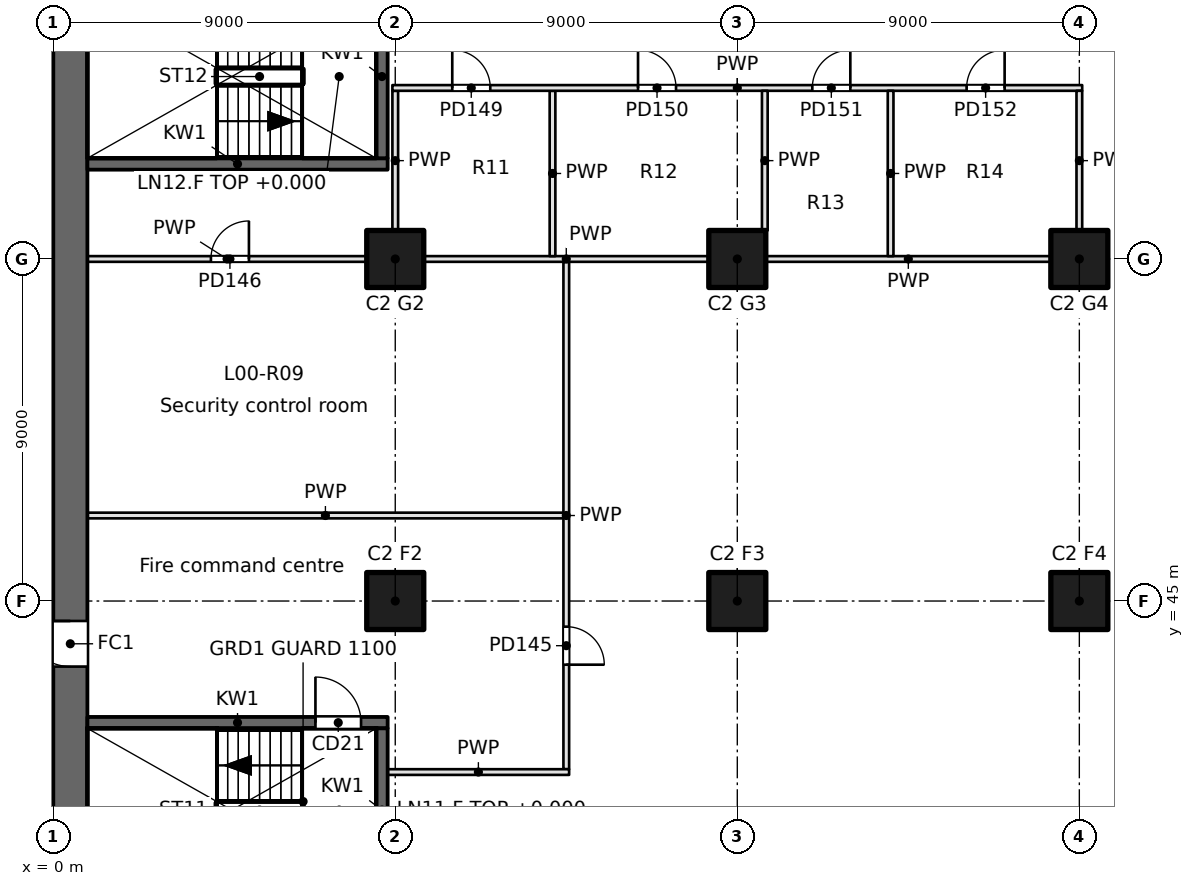
"""IFC4 building model, lengths in metres.
Left out: names, types, materials, properties, quantities, classifications, styles, units other than length and angle.
Written with IfcOpenShell. Run it as: python <this file> out.ifc"""

import sys

from ifc_helpers import new_model, si_unit, direction, frame, frame_2d, origin, origin_2d, place, context, subcontext, project, spatial, rectangle, extrude, element, fill, save


model = new_model("IFC4")
c1 = context("Model", 3, precision=1e-05, world=origin(), true_north=direction((0.0, 1.0)))
c2 = subcontext(c1, "Body", "Model", "MODEL_VIEW")
j1 = project(units=[si_unit("LENGTHUNIT", "METRE"), si_unit("PLANEANGLEUNIT", "RADIAN")], contexts=[c1])
p1 = place(None, origin())
s1 = spatial("IfcSite", under=j1, at=p1, CompositionType="ELEMENT")
p2 = place(p1, origin())
s2 = spatial("IfcBuilding", under=s1, at=p2, CompositionType="ELEMENT")
p3 = place(p2, origin())
s3 = spatial("IfcBuildingStorey", under=s2, at=p3, CompositionType="ELEMENT", Elevation=0.0)
for number, where, z_axis, x_axis in (
    (1, (9.0, 45.0, 0.0), (0.0, 0.0, 1.0), (1.0, 0.0, 0.0)),
    (2, (9.0, 54.0, 0.0), (0.0, 0.0, 1.0), (1.0, 0.0, 0.0)),
    (3, (18.0, 45.0, 0.0), (0.0, 0.0, 1.0), (1.0, 0.0, 0.0)),
    (4, (18.0, 54.0, 0.0), (0.0, 0.0, 1.0), (1.0, 0.0, 0.0)),
    (5, (27.0, 45.0, 0.0), (0.0, 0.0, 1.0), (1.0, 0.0, 0.0)),
    (6, (27.0, 54.0, 0.0), (0.0, 0.0, 1.0), (1.0, 0.0, 0.0)),
):
    element("IfcColumn", number, at=place(p3, frame(where, z_axis=z_axis, x_axis=x_axis)), inside=s3, PredefinedType="COLUMN", context=c2, shape_type="SweptSolid", body=[
        extrude(rectangle(XDim=1.5, YDim=1.5, at=origin_2d()), origin(), (0.0, 0.0, 1.0), 6.0),
    ])
p4 = place(p3, frame((0.45, 94.5, 0.0), z_axis=(0.0, 0.0, 1.0), x_axis=(0.0, -1.0, 0.0)))
e7 = element("IfcWall", 7, at=p4, inside=s3, PredefinedType="SHEAR", context=c2, shape_type="SweptSolid", body=[
    extrude(rectangle(XDim=66.085, YDim=0.9, at=frame_2d((33.042, 0.0))), origin(), (0.0, 0.0, 1.0), 6.0),
])
p5 = place(p4, frame((50.025, 0.0, 0.0)))
e8 = element("IfcOpeningElement", 8, at=p5, cuts=e7, PredefinedType="OPENING", context=c2, shape_type="SweptSolid", body=[
    extrude(rectangle(XDim=1.2, YDim=2.1, at=frame_2d((0.6, 1.05))), frame((0.0, 0.45, 0.0), z_axis=(0.0, -1.0, 0.0), x_axis=(1.0, 0.0, 0.0)), (0.0, 0.0, 1.0), 0.9),
])
p6 = place(p3, frame((0.9, 41.8, -0.4), z_axis=(0.0, 0.0, 1.0), x_axis=(1.0, 0.0, 0.0)))
e9 = element("IfcWall", 9, at=p6, inside=s3, PredefinedType="SOLIDWALL", context=c2, shape_type="SweptSolid", body=[
    extrude(rectangle(XDim=7.9, YDim=0.3, at=frame_2d((3.95, 0.0))), origin(), (0.0, 0.0, 1.0), 6.05),
])
p7 = place(p6, frame((6.0, 0.0, 0.4)))
e10 = element("IfcOpeningElement", 10, at=p7, cuts=e9, PredefinedType="OPENING", context=c2, shape_type="SweptSolid", body=[
    extrude(rectangle(XDim=1.2, YDim=2.1, at=frame_2d((0.6, 1.05))), frame((0.0, 0.15, 0.0), z_axis=(0.0, -1.0, 0.0), x_axis=(1.0, 0.0, 0.0)), (0.0, 0.0, 1.0), 0.3),
])
p8 = place(p3, frame((0.9, 56.5, -0.4), z_axis=(0.0, 0.0, 1.0), x_axis=(1.0, 0.0, 0.0)))
e11 = element("IfcWall", 11, at=p8, inside=s3, PredefinedType="SOLIDWALL", context=c2, shape_type="SweptSolid", body=[
    extrude(rectangle(XDim=7.9, YDim=0.3, at=frame_2d((3.95, 0.0))), origin(), (0.0, 0.0, 1.0), 6.05),
])
p9 = place(p3, frame((8.65, 37.35, -0.4), z_axis=(0.0, 0.0, 1.0), x_axis=(0.0, 1.0, 0.0)))
e12 = element("IfcWall", 12, at=p9, inside=s3, PredefinedType="SOLIDWALL", context=c2, shape_type="SweptSolid", body=[
    extrude(rectangle(XDim=4.3, YDim=0.3, at=frame_2d((2.15, 0.0))), origin(), (0.0, 0.0, 1.0), 6.05),
])
p10 = place(p3, frame((8.65, 56.65, -0.4), z_axis=(0.0, 0.0, 1.0), x_axis=(0.0, 1.0, 0.0)))
e13 = element("IfcWall", 13, at=p10, inside=s3, PredefinedType="SOLIDWALL", context=c2, shape_type="SweptSolid", body=[
    extrude(rectangle(XDim=4.3, YDim=0.3, at=frame_2d((2.15, 0.0))), origin(), (0.0, 0.0, 1.0), 6.05),
])
p11 = place(p3, frame((0.9, 47.25, 0.0), z_axis=(0.0, 0.0, 1.0), x_axis=(1.0, 0.0, 0.0)))
e14 = element("IfcWall", 14, at=p11, inside=s3, PredefinedType="PARTITIONING", context=c2, shape_type="SweptSolid", body=[
    extrude(rectangle(XDim=12.525, YDim=0.15, at=frame_2d((6.263, 0.0))), origin(), (0.0, 0.0, 1.0), 5.65),
])
p12 = place(p3, frame((13.5, 53.925, 0.0), z_axis=(0.0, 0.0, 1.0), x_axis=(0.0, -1.0, 0.0)))
e15 = element("IfcWall", 15, at=p12, inside=s3, PredefinedType="PARTITIONING", context=c2, shape_type="SweptSolid", body=[
    extrude(rectangle(XDim=13.35, YDim=0.15, at=frame_2d((6.675, 0.0))), origin(), (0.0, 0.0, 1.0), 5.65),
])
p13 = place(p12, frame((9.6, 0.0, 0.0)))
e16 = element("IfcOpeningElement", 16, at=p13, cuts=e15, PredefinedType="OPENING", context=c2, shape_type="SweptSolid", body=[
    extrude(rectangle(XDim=1.0, YDim=2.1, at=frame_2d((0.5, 1.05))), frame((0.0, 0.075, 0.0), z_axis=(0.0, -1.0, 0.0), x_axis=(1.0, 0.0, 0.0)), (0.0, 0.0, 1.0), 0.15),
])
p14 = place(p3, frame((13.575, 40.5, 0.0), z_axis=(0.0, 0.0, 1.0), x_axis=(-1.0, 0.0, 0.0)))
e17 = element("IfcWall", 17, at=p14, inside=s3, PredefinedType="PARTITIONING", context=c2, shape_type="SweptSolid", body=[
    extrude(rectangle(XDim=4.775, YDim=0.15, at=frame_2d((2.387, 0.0))), origin(), (0.0, 0.0, 1.0), 5.65),
])
p15 = place(p3, frame((0.9, 54.0, 0.0), z_axis=(0.0, 0.0, 1.0), x_axis=(1.0, 0.0, 0.0)))
e18 = element("IfcWall", 18, at=p15, inside=s3, PredefinedType="PARTITIONING", context=c2, shape_type="SweptSolid", body=[
    extrude(rectangle(XDim=7.35, YDim=0.15, at=frame_2d((3.675, 0.0))), origin(), (0.0, 0.0, 1.0), 5.65),
])
p16 = place(p15, frame((3.25, 0.0, 0.0)))
e19 = element("IfcOpeningElement", 19, at=p16, cuts=e18, PredefinedType="OPENING", context=c2, shape_type="SweptSolid", body=[
    extrude(rectangle(XDim=1.0, YDim=2.1, at=frame_2d((0.5, 1.05))), frame((0.0, 0.075, 0.0), z_axis=(0.0, -1.0, 0.0), x_axis=(1.0, 0.0, 0.0)), (0.0, 0.0, 1.0), 0.15),
])
for number, where, z_axis, x_axis in (
    (20, (9.75, 54.0, 0.0), (0.0, 0.0, 1.0), (1.0, 0.0, 0.0)),
    (21, (26.25, 54.0, 0.0), (0.0, 0.0, 1.0), (-1.0, 0.0, 0.0)),
):
    element("IfcWall", number, at=place(p3, frame(where, z_axis=z_axis, x_axis=x_axis)), inside=s3, PredefinedType="PARTITIONING", context=c2, shape_type="SweptSolid", body=[
        extrude(rectangle(XDim=7.5, YDim=0.15, at=frame_2d((3.75, 0.0))), origin(), (0.0, 0.0, 1.0), 5.65),
    ])
p17 = place(p3, frame((13.138, 54.075, 0.0), z_axis=(0.0, 0.0, 1.0), x_axis=(0.0, 1.0, 0.0)))
e22 = element("IfcWall", 22, at=p17, inside=s3, PredefinedType="PARTITIONING", context=c2, shape_type="SweptSolid", body=[
    extrude(rectangle(XDim=4.35, YDim=0.15, at=frame_2d((2.175, 0.0))), origin(), (0.0, 0.0, 1.0), 5.65),
])
p18 = place(p3, frame((9.0, 54.75, 0.0), z_axis=(0.0, 0.0, 1.0), x_axis=(0.0, 1.0, 0.0)))
e23 = element("IfcWall", 23, at=p18, inside=s3, PredefinedType="PARTITIONING", context=c2, shape_type="SweptSolid", body=[
    extrude(rectangle(XDim=3.675, YDim=0.15, at=frame_2d((1.837, 0.0))), origin(), (0.0, 0.0, 1.0), 5.65),
])
p19 = place(p3, frame((8.925, 58.5, 0.0), z_axis=(0.0, 0.0, 1.0), x_axis=(1.0, 0.0, 0.0)))
e24 = element("IfcWall", 24, at=p19, inside=s3, PredefinedType="PARTITIONING", context=c2, shape_type="SweptSolid", body=[
    extrude(rectangle(XDim=18.15, YDim=0.15, at=frame_2d((9.075, 0.0))), origin(), (0.0, 0.0, 1.0), 5.65),
])
p20 = place(p19, frame((1.575, 0.0, 0.0)))
e25 = element("IfcOpeningElement", 25, at=p20, cuts=e24, PredefinedType="OPENING", context=c2, shape_type="SweptSolid", body=[
    extrude(rectangle(XDim=1.0, YDim=2.1, at=frame_2d((0.5, 1.05))), frame((0.0, 0.075, 0.0), z_axis=(0.0, -1.0, 0.0), x_axis=(1.0, 0.0, 0.0)), (0.0, 0.0, 1.0), 0.15),
])
p21 = place(p19, frame((6.463, 0.0, 0.0)))
e26 = element("IfcOpeningElement", 26, at=p21, cuts=e24, PredefinedType="OPENING", context=c2, shape_type="SweptSolid", body=[
    extrude(rectangle(XDim=1.0, YDim=2.1, at=frame_2d((0.5, 1.05))), frame((0.0, 0.075, 0.0), z_axis=(0.0, -1.0, 0.0), x_axis=(1.0, 0.0, 0.0)), (0.0, 0.0, 1.0), 0.15),
])
p22 = place(p19, frame((11.049, 0.0, 0.0)))
e27 = element("IfcOpeningElement", 27, at=p22, cuts=e24, PredefinedType="OPENING", context=c2, shape_type="SweptSolid", body=[
    extrude(rectangle(XDim=1.0, YDim=2.1, at=frame_2d((0.5, 1.05))), frame((0.0, 0.075, 0.0), z_axis=(0.0, -1.0, 0.0), x_axis=(1.0, 0.0, 0.0)), (0.0, 0.0, 1.0), 0.15),
])
p23 = place(p19, frame((15.109, 0.0, 0.0)))
e28 = element("IfcOpeningElement", 28, at=p23, cuts=e24, PredefinedType="OPENING", context=c2, shape_type="SweptSolid", body=[
    extrude(rectangle(XDim=1.0, YDim=2.1, at=frame_2d((0.5, 1.05))), frame((0.0, 0.075, 0.0), z_axis=(0.0, -1.0, 0.0), x_axis=(1.0, 0.0, 0.0)), (0.0, 0.0, 1.0), 0.15),
])
p24 = place(p3, frame((18.724, 54.75, 0.0), z_axis=(0.0, 0.0, 1.0), x_axis=(0.0, 1.0, 0.0)))
e29 = element("IfcWall", 29, at=p24, inside=s3, PredefinedType="PARTITIONING", context=c2, shape_type="SweptSolid", body=[
    extrude(rectangle(XDim=3.675, YDim=0.15, at=frame_2d((1.837, 0.0))), origin(), (0.0, 0.0, 1.0), 5.65),
])
p25 = place(p3, frame((22.034, 54.075, 0.0), z_axis=(0.0, 0.0, 1.0), x_axis=(0.0, 1.0, 0.0)))
e30 = element("IfcWall", 30, at=p25, inside=s3, PredefinedType="PARTITIONING", context=c2, shape_type="SweptSolid", body=[
    extrude(rectangle(XDim=4.35, YDim=0.15, at=frame_2d((2.175, 0.0))), origin(), (0.0, 0.0, 1.0), 5.65),
])
p26 = place(p3, frame((27.0, 58.425, 0.0), z_axis=(0.0, 0.0, 1.0), x_axis=(0.0, -1.0, 0.0)))
e31 = element("IfcWall", 31, at=p26, inside=s3, PredefinedType="PARTITIONING", context=c2, shape_type="SweptSolid", body=[
    extrude(rectangle(XDim=3.675, YDim=0.15, at=frame_2d((1.837, 0.0))), origin(), (0.0, 0.0, 1.0), 5.65),
])
p27 = place(p7, origin())
e32 = element("IfcDoor", 32, at=p27, inside=s3, OperationType="SINGLE_SWING_LEFT", PredefinedType="DOOR", context=c2, shape_type="SweptSolid", body=[
    extrude(rectangle(XDim=1.2, YDim=2.1, at=frame_2d((0.6, 1.05))), frame((0.0, 0.025, 0.0), z_axis=(0.0, -1.0, 0.0), x_axis=(1.0, 0.0, 0.0)), (0.0, 0.0, 1.0), 0.05),
])
fill(e10, e32)
p28 = place(p13, origin())
e33 = element("IfcDoor", 33, at=p28, inside=s3, OperationType="SINGLE_SWING_RIGHT", PredefinedType="DOOR", context=c2, shape_type="SweptSolid", body=[
    extrude(rectangle(XDim=1.0, YDim=2.1, at=frame_2d((0.5, 1.05))), frame((0.0, 0.025, 0.0), z_axis=(0.0, -1.0, 0.0), x_axis=(1.0, 0.0, 0.0)), (0.0, 0.0, 1.0), 0.05),
])
fill(e16, e33)
p29 = place(p16, origin())
e34 = element("IfcDoor", 34, at=p29, inside=s3, OperationType="SINGLE_SWING_RIGHT", PredefinedType="DOOR", context=c2, shape_type="SweptSolid", body=[
    extrude(rectangle(XDim=1.0, YDim=2.1, at=frame_2d((0.5, 1.05))), frame((0.0, 0.025, 0.0), z_axis=(0.0, -1.0, 0.0), x_axis=(1.0, 0.0, 0.0)), (0.0, 0.0, 1.0), 0.05),
])
fill(e19, e34)
p30 = place(p20, origin())
e35 = element("IfcDoor", 35, at=p30, inside=s3, OperationType="SINGLE_SWING_LEFT", PredefinedType="DOOR", context=c2, shape_type="SweptSolid", body=[
    extrude(rectangle(XDim=1.0, YDim=2.1, at=frame_2d((0.5, 1.05))), frame((0.0, 0.025, 0.0), z_axis=(0.0, -1.0, 0.0), x_axis=(1.0, 0.0, 0.0)), (0.0, 0.0, 1.0), 0.05),
])
fill(e25, e35)
p31 = place(p21, origin())
e36 = element("IfcDoor", 36, at=p31, inside=s3, OperationType="SINGLE_SWING_LEFT", PredefinedType="DOOR", context=c2, shape_type="SweptSolid", body=[
    extrude(rectangle(XDim=1.0, YDim=2.1, at=frame_2d((0.5, 1.05))), frame((0.0, 0.025, 0.0), z_axis=(0.0, -1.0, 0.0), x_axis=(1.0, 0.0, 0.0)), (0.0, 0.0, 1.0), 0.05),
])
fill(e26, e36)
p32 = place(p22, origin())
e37 = element("IfcDoor", 37, at=p32, inside=s3, OperationType="SINGLE_SWING_RIGHT", PredefinedType="DOOR", context=c2, shape_type="SweptSolid", body=[
    extrude(rectangle(XDim=1.0, YDim=2.1, at=frame_2d((0.5, 1.05))), frame((0.0, 0.025, 0.0), z_axis=(0.0, -1.0, 0.0), x_axis=(1.0, 0.0, 0.0)), (0.0, 0.0, 1.0), 0.05),
])
fill(e27, e37)
p33 = place(p23, origin())
e38 = element("IfcDoor", 38, at=p33, inside=s3, OperationType="SINGLE_SWING_RIGHT", PredefinedType="DOOR", context=c2, shape_type="SweptSolid", body=[
    extrude(rectangle(XDim=1.0, YDim=2.1, at=frame_2d((0.5, 1.05))), frame((0.0, 0.025, 0.0), z_axis=(0.0, -1.0, 0.0), x_axis=(1.0, 0.0, 0.0)), (0.0, 0.0, 1.0), 0.05),
])
fill(e28, e38)
p34 = place(p5, frame((1.2, 0.0, 0.0), z_axis=(0.0, 0.0, 1.0), x_axis=(-1.0, 0.0, 0.0)))
e39 = element("IfcDoor", 39, at=p34, inside=s3, OperationType="SINGLE_SWING_RIGHT", PredefinedType="DOOR", context=c2, shape_type="SweptSolid", body=[
    extrude(rectangle(XDim=1.2, YDim=2.1, at=frame_2d((0.6, 1.05))), frame((0.0, 0.025, 0.0), z_axis=(0.0, -1.0, 0.0), x_axis=(1.0, 0.0, 0.0)), (0.0, 0.0, 1.0), 0.05),
])
fill(e8, e39)
save(model, sys.argv[1])
